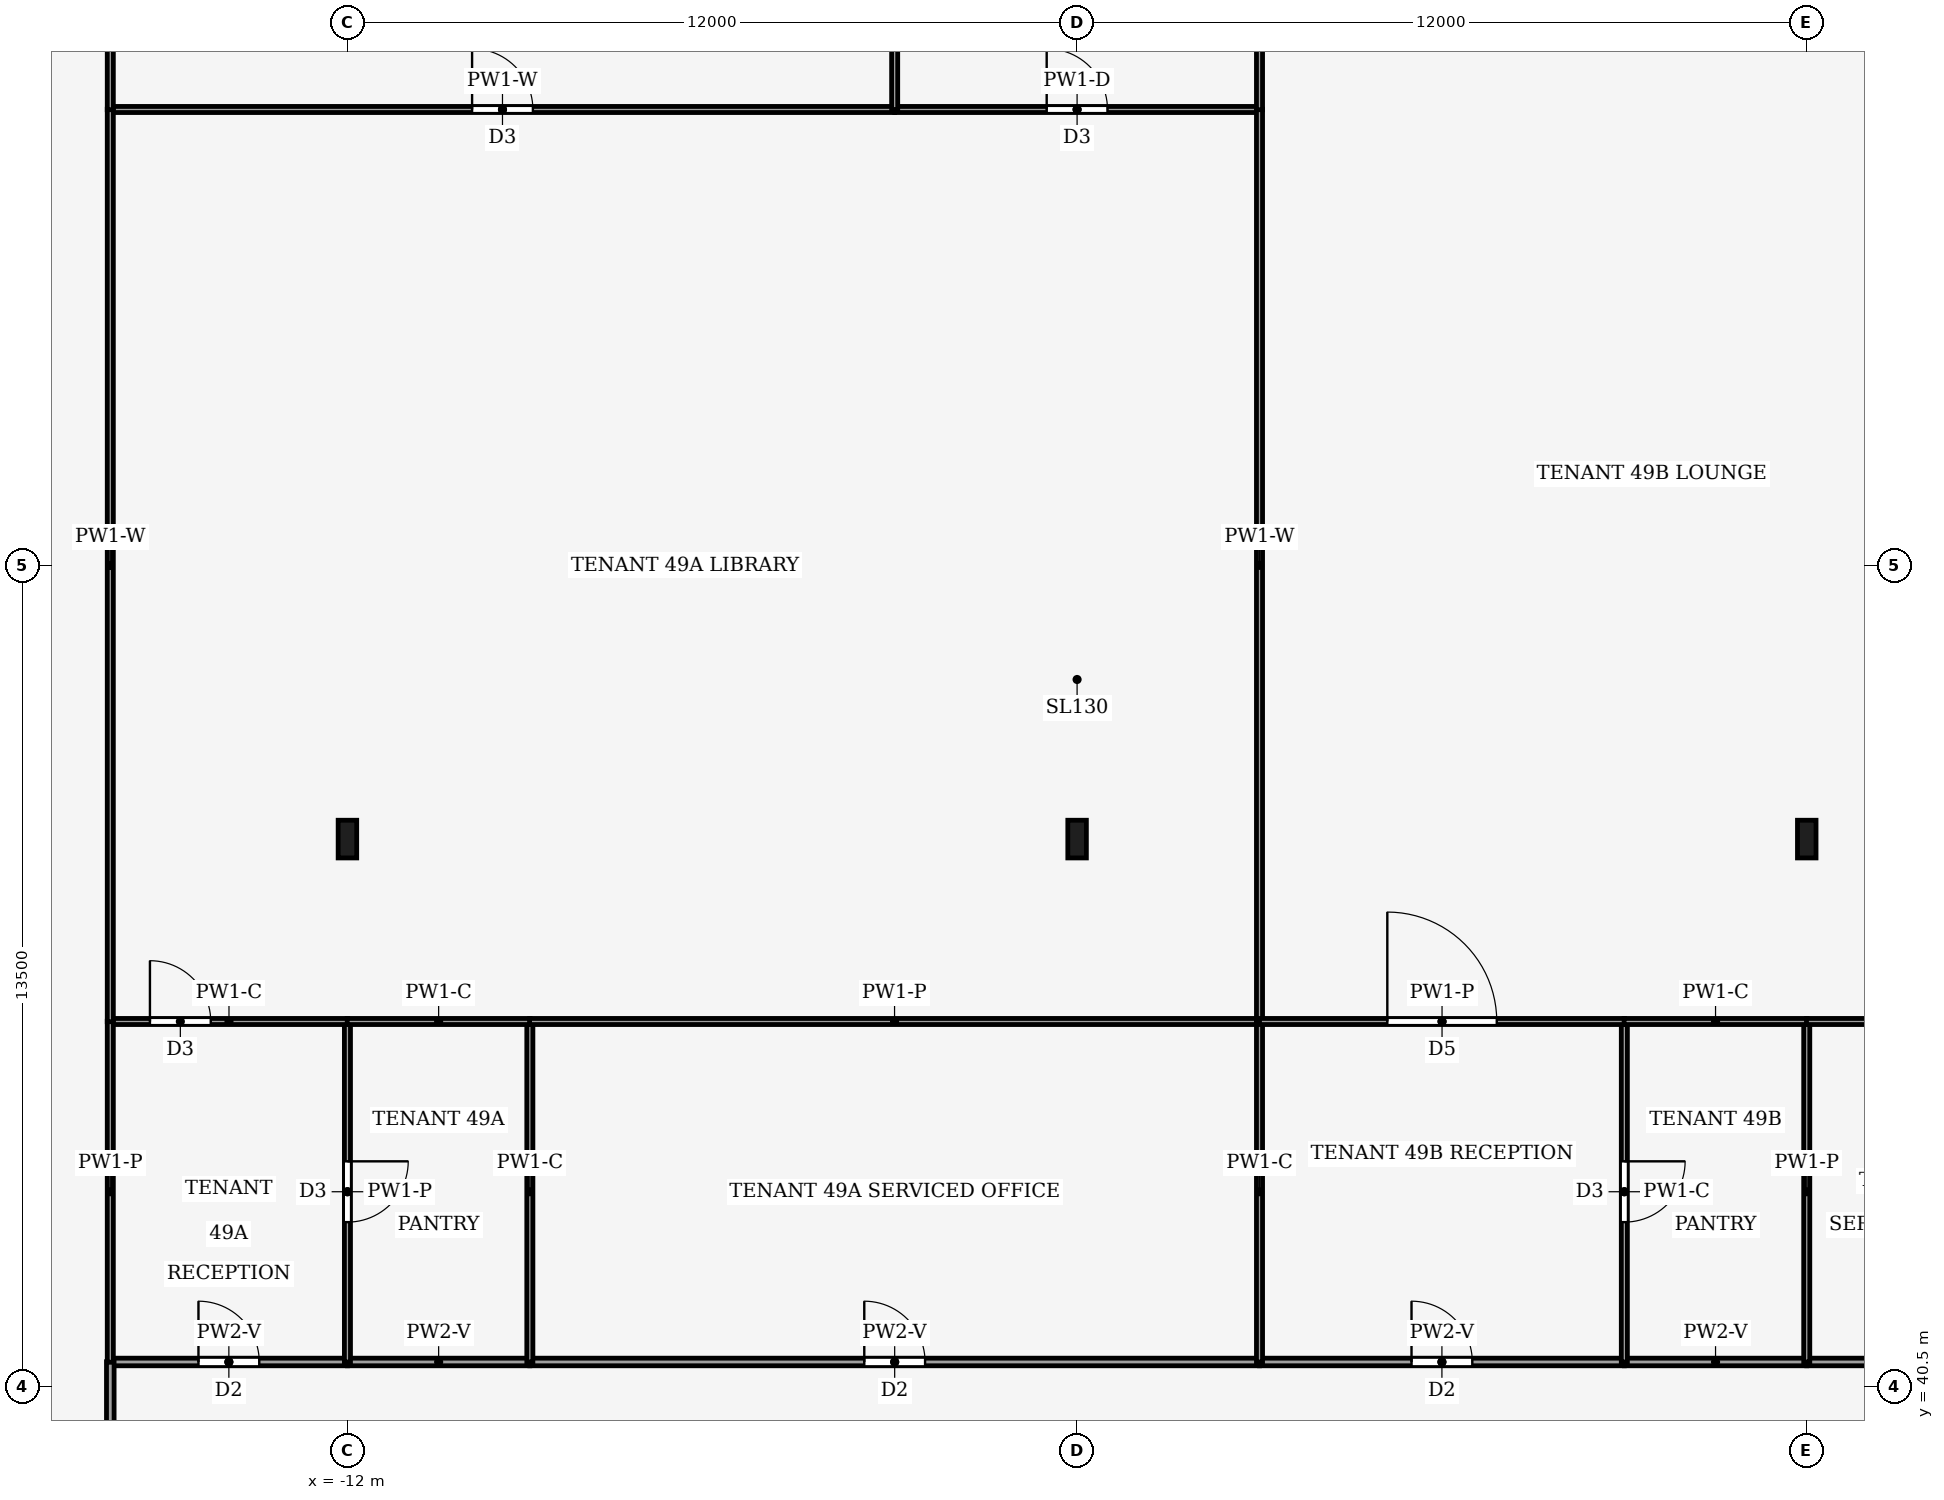
"""IFC4 building model, lengths in metres.
Left out: names, types, materials, properties, quantities, classifications, styles, units other than length and angle.
Written with IfcOpenShell. Run it as: python <this file> out.ifc"""

import sys

from ifc_helpers import new_model, si_unit, direction, frame, frame_2d, origin, origin_2d, place, context, subcontext, project, spatial, rectangle, i_section, extrude, element, fill, save


model = new_model("IFC4")
c1 = context("Model", 3, precision=1e-05, world=origin(), true_north=direction((0.0, 1.0)))
c2 = subcontext(c1, "Body", "Model", "MODEL_VIEW")
j1 = project(units=[si_unit("LENGTHUNIT", "METRE"), si_unit("PLANEANGLEUNIT", "RADIAN")], contexts=[c1])
p1 = place(None, origin())
s1 = spatial("IfcSite", under=j1, at=p1, CompositionType="ELEMENT")
p2 = place(p1, origin())
s2 = spatial("IfcBuilding", under=s1, at=p2, CompositionType="ELEMENT")
p3 = place(p2, frame((0.0, 0.0, 214.0)))
s3 = spatial("IfcBuildingStorey", under=s2, at=p3, CompositionType="ELEMENT", Elevation=214.0)
for number, where, z_axis, x_axis in (
    (1, (-12.0, 49.5, 0.0), (0.0, 0.0, 1.0), (1.0, 0.0, 0.0)),
    (2, (0.0, 49.5, 0.0), (0.0, 0.0, 1.0), (1.0, 0.0, 0.0)),
    (3, (12.0, 49.5, 0.0), (0.0, 0.0, 1.0), (1.0, 0.0, 0.0)),
):
    element("IfcColumn", number, at=place(p3, frame(where, z_axis=z_axis, x_axis=x_axis)), inside=s3, PredefinedType="COLUMN", context=c2, shape_type="SweptSolid", body=[
        extrude(i_section(OverallWidth=0.305, OverallDepth=0.62, WebThickness=0.021, FlangeThickness=0.04, FilletRadius=0.027, at=origin_2d()), origin(), (0.0, 0.0, 1.0), 4.0),
    ])
p4 = place(p3, frame((-15.9, 40.9, 0.0), z_axis=(0.0, 0.0, 1.0), x_axis=(1.0, 0.0, 0.0)))
e4 = element("IfcWall", 4, at=p4, inside=s3, PredefinedType="PARTITIONING", context=c2, shape_type="SweptSolid", body=[
    extrude(rectangle(XDim=3.9, YDim=0.125, at=frame_2d((1.95, 0.0))), origin(), (0.0, 0.0, 1.0), 3.44),
])
p5 = place(p4, frame((1.45, 0.0, 0.0)))
e5 = element("IfcOpeningElement", 5, at=p5, cuts=e4, PredefinedType="OPENING", context=c2, shape_type="SweptSolid", body=[
    extrude(rectangle(XDim=1.0, YDim=2.1, at=frame_2d((0.5, 1.05))), frame((0.0, 0.073, 0.0), z_axis=(0.0, -1.0, 0.0), x_axis=(1.0, 0.0, 0.0)), (0.0, 0.0, 1.0), 0.145),
])
p6 = place(p3, frame((-9.0, 40.9, 0.0), z_axis=(0.0, 0.0, 1.0), x_axis=(-1.0, 0.0, 0.0)))
e6 = element("IfcWall", 6, at=p6, inside=s3, PredefinedType="PARTITIONING", context=c2, shape_type="SweptSolid", body=[
    extrude(rectangle(XDim=3.0, YDim=0.125, at=frame_2d((1.5, 0.0))), origin(), (0.0, 0.0, 1.0), 3.44),
])
p7 = place(p3, frame((-9.0, 40.9, 0.0), z_axis=(0.0, 0.0, 1.0), x_axis=(1.0, 0.0, 0.0)))
e7 = element("IfcWall", 7, at=p7, inside=s3, PredefinedType="PARTITIONING", context=c2, shape_type="SweptSolid", body=[
    extrude(rectangle(XDim=12.0, YDim=0.125, at=frame_2d((6.0, 0.0))), origin(), (0.0, 0.0, 1.0), 3.44),
])
p8 = place(p7, frame((5.5, 0.0, 0.0)))
e8 = element("IfcOpeningElement", 8, at=p8, cuts=e7, PredefinedType="OPENING", context=c2, shape_type="SweptSolid", body=[
    extrude(rectangle(XDim=1.0, YDim=2.1, at=frame_2d((0.5, 1.05))), frame((0.0, 0.073, 0.0), z_axis=(0.0, -1.0, 0.0), x_axis=(1.0, 0.0, 0.0)), (0.0, 0.0, 1.0), 0.145),
])
p9 = place(p3, frame((3.0, 40.9, 0.0), z_axis=(0.0, 0.0, 1.0), x_axis=(1.0, 0.0, 0.0)))
e9 = element("IfcWall", 9, at=p9, inside=s3, PredefinedType="PARTITIONING", context=c2, shape_type="SweptSolid", body=[
    extrude(rectangle(XDim=6.0, YDim=0.125, at=frame_2d((3.0, 0.0))), origin(), (0.0, 0.0, 1.0), 3.44),
])
p10 = place(p9, frame((2.5, 0.0, 0.0)))
e10 = element("IfcOpeningElement", 10, at=p10, cuts=e9, PredefinedType="OPENING", context=c2, shape_type="SweptSolid", body=[
    extrude(rectangle(XDim=1.0, YDim=2.1, at=frame_2d((0.5, 1.05))), frame((0.0, 0.073, 0.0), z_axis=(0.0, -1.0, 0.0), x_axis=(1.0, 0.0, 0.0)), (0.0, 0.0, 1.0), 0.145),
])
p11 = place(p3, frame((12.0, 40.9, 0.0), z_axis=(0.0, 0.0, 1.0), x_axis=(-1.0, 0.0, 0.0)))
e11 = element("IfcWall", 11, at=p11, inside=s3, PredefinedType="PARTITIONING", context=c2, shape_type="SweptSolid", body=[
    extrude(rectangle(XDim=3.0, YDim=0.125, at=frame_2d((1.5, 0.0))), origin(), (0.0, 0.0, 1.0), 3.44),
])
p12 = place(p3, frame((12.0, 40.9, 0.0), z_axis=(0.0, 0.0, 1.0), x_axis=(1.0, 0.0, 0.0)))
e12 = element("IfcWall", 12, at=p12, inside=s3, PredefinedType="PARTITIONING", context=c2, shape_type="SweptSolid", body=[
    extrude(rectangle(XDim=3.9, YDim=0.125, at=frame_2d((1.95, 0.0))), origin(), (0.0, 0.0, 1.0), 3.44),
])
p13 = place(p12, frame((1.45, 0.0, 0.0)))
e13 = element("IfcOpeningElement", 13, at=p13, cuts=e12, PredefinedType="OPENING", context=c2, shape_type="SweptSolid", body=[
    extrude(rectangle(XDim=1.0, YDim=2.1, at=frame_2d((0.5, 1.05))), frame((0.0, 0.073, 0.0), z_axis=(0.0, -1.0, 0.0), x_axis=(1.0, 0.0, 0.0)), (0.0, 0.0, 1.0), 0.145),
])
p14 = place(p3, frame((-15.9, 31.5, 0.0), z_axis=(0.0, 0.0, 1.0), x_axis=(0.0, 1.0, 0.0)))
e14 = element("IfcWall", 14, at=p14, inside=s3, PredefinedType="PARTITIONING", context=c2, shape_type="SweptSolid", body=[
    extrude(rectangle(XDim=9.404, YDim=0.125, at=frame_2d((4.702, 0.0))), origin(), (0.0, 0.0, 1.0), 3.14),
])
p15 = place(p14, frame((4.202, 0.0, 0.0)))
e15 = element("IfcOpeningElement", 15, at=p15, cuts=e14, PredefinedType="OPENING", context=c2, shape_type="SweptSolid", body=[
    extrude(rectangle(XDim=1.0, YDim=2.1, at=frame_2d((0.5, 1.05))), frame((0.0, 0.073, 0.0), z_axis=(0.0, -1.0, 0.0), x_axis=(1.0, 0.0, 0.0)), (0.0, 0.0, 1.0), 0.145),
])
p16 = place(p3, frame((-12.0, 46.5, 0.0), z_axis=(0.0, 0.0, 1.0), x_axis=(0.0, -1.0, 0.0)))
e16 = element("IfcWall", 16, at=p16, inside=s3, PredefinedType="PARTITIONING", context=c2, shape_type="SweptSolid", body=[
    extrude(rectangle(XDim=5.6, YDim=0.1, at=frame_2d((2.8, 0.0))), origin(), (0.0, 0.0, 1.0), 3.44),
])
p17 = place(p16, frame((2.3, 0.0, 0.0)))
e17 = element("IfcOpeningElement", 17, at=p17, cuts=e16, PredefinedType="OPENING", context=c2, shape_type="SweptSolid", body=[
    extrude(rectangle(XDim=1.0, YDim=2.1, at=frame_2d((0.5, 1.05))), frame((0.0, 0.06, 0.0), z_axis=(0.0, -1.0, 0.0), x_axis=(1.0, 0.0, 0.0)), (0.0, 0.0, 1.0), 0.12),
])
p18 = place(p3, frame((-15.9, 46.5, 0.0), z_axis=(0.0, 0.0, 1.0), x_axis=(1.0, 0.0, 0.0)))
e18 = element("IfcWall", 18, at=p18, inside=s3, PredefinedType="PARTITIONING", context=c2, shape_type="SweptSolid", body=[
    extrude(rectangle(XDim=3.904, YDim=0.1, at=frame_2d((1.952, 0.0))), origin(), (0.0, 0.0, 1.0), 3.87),
])
p19 = place(p18, frame((0.652, 0.0, 0.0)))
e19 = element("IfcOpeningElement", 19, at=p19, cuts=e18, PredefinedType="OPENING", context=c2, shape_type="SweptSolid", body=[
    extrude(rectangle(XDim=1.0, YDim=2.1, at=frame_2d((0.5, 1.05))), frame((0.0, 0.06, 0.0), z_axis=(0.0, -1.0, 0.0), x_axis=(1.0, 0.0, 0.0)), (0.0, 0.0, 1.0), 0.12),
])
p20 = place(p3, frame((-15.9, 46.504, 0.0), z_axis=(0.0, 0.0, 1.0), x_axis=(0.0, -1.0, 0.0)))
e20 = element("IfcWall", 20, at=p20, inside=s3, PredefinedType="PARTITIONING", context=c2, shape_type="SweptSolid", body=[
    extrude(rectangle(XDim=5.608, YDim=0.1, at=frame_2d((2.804, 0.0))), origin(), (0.0, 0.0, 1.0), 3.44),
])
p21 = place(p3, frame((-9.0, 40.9, 0.0), z_axis=(0.0, 0.0, 1.0), x_axis=(0.0, 1.0, 0.0)))
e21 = element("IfcWall", 21, at=p21, inside=s3, PredefinedType="PARTITIONING", context=c2, shape_type="SweptSolid", body=[
    extrude(rectangle(XDim=5.6, YDim=0.1, at=frame_2d((2.8, 0.0))), origin(), (0.0, 0.0, 1.0), 3.87),
])
p22 = place(p3, frame((-8.996, 46.5, 0.0), z_axis=(0.0, 0.0, 1.0), x_axis=(-1.0, 0.0, 0.0)))
e22 = element("IfcWall", 22, at=p22, inside=s3, PredefinedType="PARTITIONING", context=c2, shape_type="SweptSolid", body=[
    extrude(rectangle(XDim=3.008, YDim=0.1, at=frame_2d((1.504, 0.0))), origin(), (0.0, 0.0, 1.0), 3.87),
])
p23 = place(p3, frame((3.0, 46.5, 0.0), z_axis=(0.0, 0.0, 1.0), x_axis=(-1.0, 0.0, 0.0)))
e23 = element("IfcWall", 23, at=p23, inside=s3, PredefinedType="PARTITIONING", context=c2, shape_type="SweptSolid", body=[
    extrude(rectangle(XDim=12.004, YDim=0.1, at=frame_2d((6.002, 0.0))), origin(), (0.0, 0.0, 1.0), 3.44),
])
p24 = place(p3, frame((3.0, 40.9, 0.0), z_axis=(0.0, 0.0, 1.0), x_axis=(0.0, 1.0, 0.0)))
e24 = element("IfcWall", 24, at=p24, inside=s3, PredefinedType="PARTITIONING", context=c2, shape_type="SweptSolid", body=[
    extrude(rectangle(XDim=5.6, YDim=0.1, at=frame_2d((2.8, 0.0))), origin(), (0.0, 0.0, 1.0), 3.87),
])
p25 = place(p3, frame((-15.9, 61.5, 0.0), z_axis=(0.0, 0.0, 1.0), x_axis=(1.0, 0.0, 0.0)))
e25 = element("IfcWall", 25, at=p25, inside=s3, PredefinedType="PARTITIONING", context=c2, shape_type="SweptSolid", body=[
    extrude(rectangle(XDim=12.9, YDim=0.1, at=frame_2d((6.45, 0.0))), origin(), (0.0, 0.0, 1.0), 3.24),
])
p26 = place(p25, frame((5.95, 0.0, 0.0)))
e26 = element("IfcOpeningElement", 26, at=p26, cuts=e25, PredefinedType="OPENING", context=c2, shape_type="SweptSolid", body=[
    extrude(rectangle(XDim=1.0, YDim=2.1, at=frame_2d((0.5, 1.05))), frame((0.0, 0.06, 0.0), z_axis=(0.0, -1.0, 0.0), x_axis=(1.0, 0.0, 0.0)), (0.0, 0.0, 1.0), 0.12),
])
p27 = place(p3, frame((-3.0, 61.5, 0.0), z_axis=(0.0, 0.0, 1.0), x_axis=(1.0, 0.0, 0.0)))
e27 = element("IfcWall", 27, at=p27, inside=s3, PredefinedType="PARTITIONING", context=c2, shape_type="SweptSolid", body=[
    extrude(rectangle(XDim=6.0, YDim=0.1, at=frame_2d((3.0, 0.0))), origin(), (0.0, 0.0, 1.0), 3.29),
])
p28 = place(p27, frame((2.5, 0.0, 0.0)))
e28 = element("IfcOpeningElement", 28, at=p28, cuts=e27, PredefinedType="OPENING", context=c2, shape_type="SweptSolid", body=[
    extrude(rectangle(XDim=1.0, YDim=2.1, at=frame_2d((0.5, 1.05))), frame((0.0, 0.06, 0.0), z_axis=(0.0, -1.0, 0.0), x_axis=(1.0, 0.0, 0.0)), (0.0, 0.0, 1.0), 0.12),
])
p29 = place(p3, frame((3.0, 46.5, 0.0), z_axis=(0.0, 0.0, 1.0), x_axis=(0.0, 1.0, 0.0)))
e29 = element("IfcWall", 29, at=p29, inside=s3, PredefinedType="PARTITIONING", context=c2, shape_type="SweptSolid", body=[
    extrude(rectangle(XDim=15.004, YDim=0.1, at=frame_2d((7.502, 0.0))), origin(), (0.0, 0.0, 1.0), 3.24),
])
p30 = place(p3, frame((-15.9, 61.504, 0.0), z_axis=(0.0, 0.0, 1.0), x_axis=(0.0, -1.0, 0.0)))
e30 = element("IfcWall", 30, at=p30, inside=s3, PredefinedType="PARTITIONING", context=c2, shape_type="SweptSolid", body=[
    extrude(rectangle(XDim=15.008, YDim=0.1, at=frame_2d((7.504, 0.0))), origin(), (0.0, 0.0, 1.0), 3.24),
])
p31 = place(p3, frame((-3.0, 61.5, 0.0), z_axis=(0.0, 0.0, 1.0), x_axis=(0.0, 1.0, 0.0)))
e31 = element("IfcWall", 31, at=p31, inside=s3, PredefinedType="PARTITIONING", context=c2, shape_type="SweptSolid", body=[
    extrude(rectangle(XDim=6.33, YDim=0.1, at=frame_2d((3.165, 0.0))), origin(), (0.0, 0.0, 1.0), 3.04),
])
p32 = place(p3, frame((-15.9, 68.905, 0.0), z_axis=(0.0, 0.0, 1.0), x_axis=(0.0, -1.0, 0.0)))
e32 = element("IfcWall", 32, at=p32, inside=s3, PredefinedType="PARTITIONING", context=c2, shape_type="SweptSolid", body=[
    extrude(rectangle(XDim=7.409, YDim=0.1, at=frame_2d((3.705, 0.0))), origin(), (0.0, 0.0, 1.0), 3.04),
])
p33 = place(p3, frame((3.0, 61.496, 0.0), z_axis=(0.0, 0.0, 1.0), x_axis=(0.0, 1.0, 0.0)))
e33 = element("IfcWall", 33, at=p33, inside=s3, PredefinedType="PARTITIONING", context=c2, shape_type="SweptSolid", body=[
    extrude(rectangle(XDim=3.004, YDim=0.1, at=frame_2d((1.502, 0.0))), origin(), (0.0, 0.0, 1.0), 3.87),
])
p34 = place(p3, frame((9.0, 46.5, 0.0), z_axis=(0.0, 0.0, 1.0), x_axis=(0.0, -1.0, 0.0)))
e34 = element("IfcWall", 34, at=p34, inside=s3, PredefinedType="PARTITIONING", context=c2, shape_type="SweptSolid", body=[
    extrude(rectangle(XDim=5.6, YDim=0.1, at=frame_2d((2.8, 0.0))), origin(), (0.0, 0.0, 1.0), 3.87),
])
p35 = place(p34, frame((2.3, 0.0, 0.0)))
e35 = element("IfcOpeningElement", 35, at=p35, cuts=e34, PredefinedType="OPENING", context=c2, shape_type="SweptSolid", body=[
    extrude(rectangle(XDim=1.0, YDim=2.1, at=frame_2d((0.5, 1.05))), frame((0.0, 0.06, 0.0), z_axis=(0.0, -1.0, 0.0), x_axis=(1.0, 0.0, 0.0)), (0.0, 0.0, 1.0), 0.12),
])
p36 = place(p3, frame((3.0, 46.5, 0.0), z_axis=(0.0, 0.0, 1.0), x_axis=(1.0, 0.0, 0.0)))
e36 = element("IfcWall", 36, at=p36, inside=s3, PredefinedType="PARTITIONING", context=c2, shape_type="SweptSolid", body=[
    extrude(rectangle(XDim=6.004, YDim=0.1, at=frame_2d((3.002, 0.0))), origin(), (0.0, 0.0, 1.0), 3.44),
])
p37 = place(p36, frame((2.102, 0.0, 0.0)))
e37 = element("IfcOpeningElement", 37, at=p37, cuts=e36, PredefinedType="OPENING", context=c2, shape_type="SweptSolid", body=[
    extrude(rectangle(XDim=1.8, YDim=2.1, at=frame_2d((0.9, 1.05))), frame((0.0, 0.06, 0.0), z_axis=(0.0, -1.0, 0.0), x_axis=(1.0, 0.0, 0.0)), (0.0, 0.0, 1.0), 0.12),
])
p38 = place(p3, frame((12.0, 40.9, 0.0), z_axis=(0.0, 0.0, 1.0), x_axis=(0.0, 1.0, 0.0)))
e38 = element("IfcWall", 38, at=p38, inside=s3, PredefinedType="PARTITIONING", context=c2, shape_type="SweptSolid", body=[
    extrude(rectangle(XDim=5.6, YDim=0.1, at=frame_2d((2.8, 0.0))), origin(), (0.0, 0.0, 1.0), 3.44),
])
p39 = place(p3, frame((12.004, 46.5, 0.0), z_axis=(0.0, 0.0, 1.0), x_axis=(-1.0, 0.0, 0.0)))
e39 = element("IfcWall", 39, at=p39, inside=s3, PredefinedType="PARTITIONING", context=c2, shape_type="SweptSolid", body=[
    extrude(rectangle(XDim=3.008, YDim=0.1, at=frame_2d((1.504, 0.0))), origin(), (0.0, 0.0, 1.0), 3.87),
])
p40 = place(p3, frame((15.9, 46.5, 0.0), z_axis=(0.0, 0.0, 1.0), x_axis=(-1.0, 0.0, 0.0)))
e40 = element("IfcWall", 40, at=p40, inside=s3, PredefinedType="PARTITIONING", context=c2, shape_type="SweptSolid", body=[
    extrude(rectangle(XDim=3.904, YDim=0.1, at=frame_2d((1.952, 0.0))), origin(), (0.0, 0.0, 1.0), 3.87),
])
p41 = place(p5, origin())
e41 = element("IfcDoor", 41, at=p41, inside=s3, OperationType="SINGLE_SWING_LEFT", PredefinedType="DOOR", context=c2, shape_type="SweptSolid", body=[
    extrude(rectangle(XDim=1.0, YDim=2.1, at=frame_2d((0.5, 1.05))), frame((0.0, 0.025, 0.0), z_axis=(0.0, -1.0, 0.0), x_axis=(1.0, 0.0, 0.0)), (0.0, 0.0, 1.0), 0.05),
])
fill(e5, e41)
p42 = place(p8, origin())
e42 = element("IfcDoor", 42, at=p42, inside=s3, OperationType="SINGLE_SWING_RIGHT", PredefinedType="DOOR", context=c2, shape_type="SweptSolid", body=[
    extrude(rectangle(XDim=1.0, YDim=2.1, at=frame_2d((0.5, 1.05))), frame((0.0, 0.025, 0.0), z_axis=(0.0, -1.0, 0.0), x_axis=(1.0, 0.0, 0.0)), (0.0, 0.0, 1.0), 0.05),
])
fill(e8, e42)
p43 = place(p10, origin())
e43 = element("IfcDoor", 43, at=p43, inside=s3, OperationType="SINGLE_SWING_LEFT", PredefinedType="DOOR", context=c2, shape_type="SweptSolid", body=[
    extrude(rectangle(XDim=1.0, YDim=2.1, at=frame_2d((0.5, 1.05))), frame((0.0, 0.025, 0.0), z_axis=(0.0, -1.0, 0.0), x_axis=(1.0, 0.0, 0.0)), (0.0, 0.0, 1.0), 0.05),
])
fill(e10, e43)
p44 = place(p17, origin())
e44 = element("IfcDoor", 44, at=p44, inside=s3, OperationType="SINGLE_SWING_RIGHT", PredefinedType="DOOR", context=c2, shape_type="SweptSolid", body=[
    extrude(rectangle(XDim=1.0, YDim=2.1, at=frame_2d((0.5, 1.05))), frame((0.0, 0.025, 0.0), z_axis=(0.0, -1.0, 0.0), x_axis=(1.0, 0.0, 0.0)), (0.0, 0.0, 1.0), 0.05),
])
fill(e17, e44)
p45 = place(p19, origin())
e45 = element("IfcDoor", 45, at=p45, inside=s3, OperationType="SINGLE_SWING_LEFT", PredefinedType="DOOR", context=c2, shape_type="SweptSolid", body=[
    extrude(rectangle(XDim=1.0, YDim=2.1, at=frame_2d((0.5, 1.05))), frame((0.0, 0.025, 0.0), z_axis=(0.0, -1.0, 0.0), x_axis=(1.0, 0.0, 0.0)), (0.0, 0.0, 1.0), 0.05),
])
fill(e19, e45)
p46 = place(p26, origin())
e46 = element("IfcDoor", 46, at=p46, inside=s3, OperationType="SINGLE_SWING_RIGHT", PredefinedType="DOOR", context=c2, shape_type="SweptSolid", body=[
    extrude(rectangle(XDim=1.0, YDim=2.1, at=frame_2d((0.5, 1.05))), frame((0.0, 0.025, 0.0), z_axis=(0.0, -1.0, 0.0), x_axis=(1.0, 0.0, 0.0)), (0.0, 0.0, 1.0), 0.05),
])
fill(e26, e46)
p47 = place(p28, origin())
e47 = element("IfcDoor", 47, at=p47, inside=s3, OperationType="SINGLE_SWING_LEFT", PredefinedType="DOOR", context=c2, shape_type="SweptSolid", body=[
    extrude(rectangle(XDim=1.0, YDim=2.1, at=frame_2d((0.5, 1.05))), frame((0.0, 0.025, 0.0), z_axis=(0.0, -1.0, 0.0), x_axis=(1.0, 0.0, 0.0)), (0.0, 0.0, 1.0), 0.05),
])
fill(e28, e47)
p48 = place(p35, origin())
e48 = element("IfcDoor", 48, at=p48, inside=s3, OperationType="SINGLE_SWING_RIGHT", PredefinedType="DOOR", context=c2, shape_type="SweptSolid", body=[
    extrude(rectangle(XDim=1.0, YDim=2.1, at=frame_2d((0.5, 1.05))), frame((0.0, 0.025, 0.0), z_axis=(0.0, -1.0, 0.0), x_axis=(1.0, 0.0, 0.0)), (0.0, 0.0, 1.0), 0.05),
])
fill(e35, e48)
p49 = place(p37, origin())
e49 = element("IfcDoor", 49, at=p49, inside=s3, OperationType="DOUBLE_DOOR_SINGLE_SWING", PredefinedType="DOOR", context=c2, shape_type="SweptSolid", body=[
    extrude(rectangle(XDim=1.8, YDim=2.1, at=frame_2d((0.9, 1.05))), frame((0.0, 0.025, 0.0), z_axis=(0.0, -1.0, 0.0), x_axis=(1.0, 0.0, 0.0)), (0.0, 0.0, 1.0), 0.05),
])
fill(e37, e49)
save(model, sys.argv[1])
